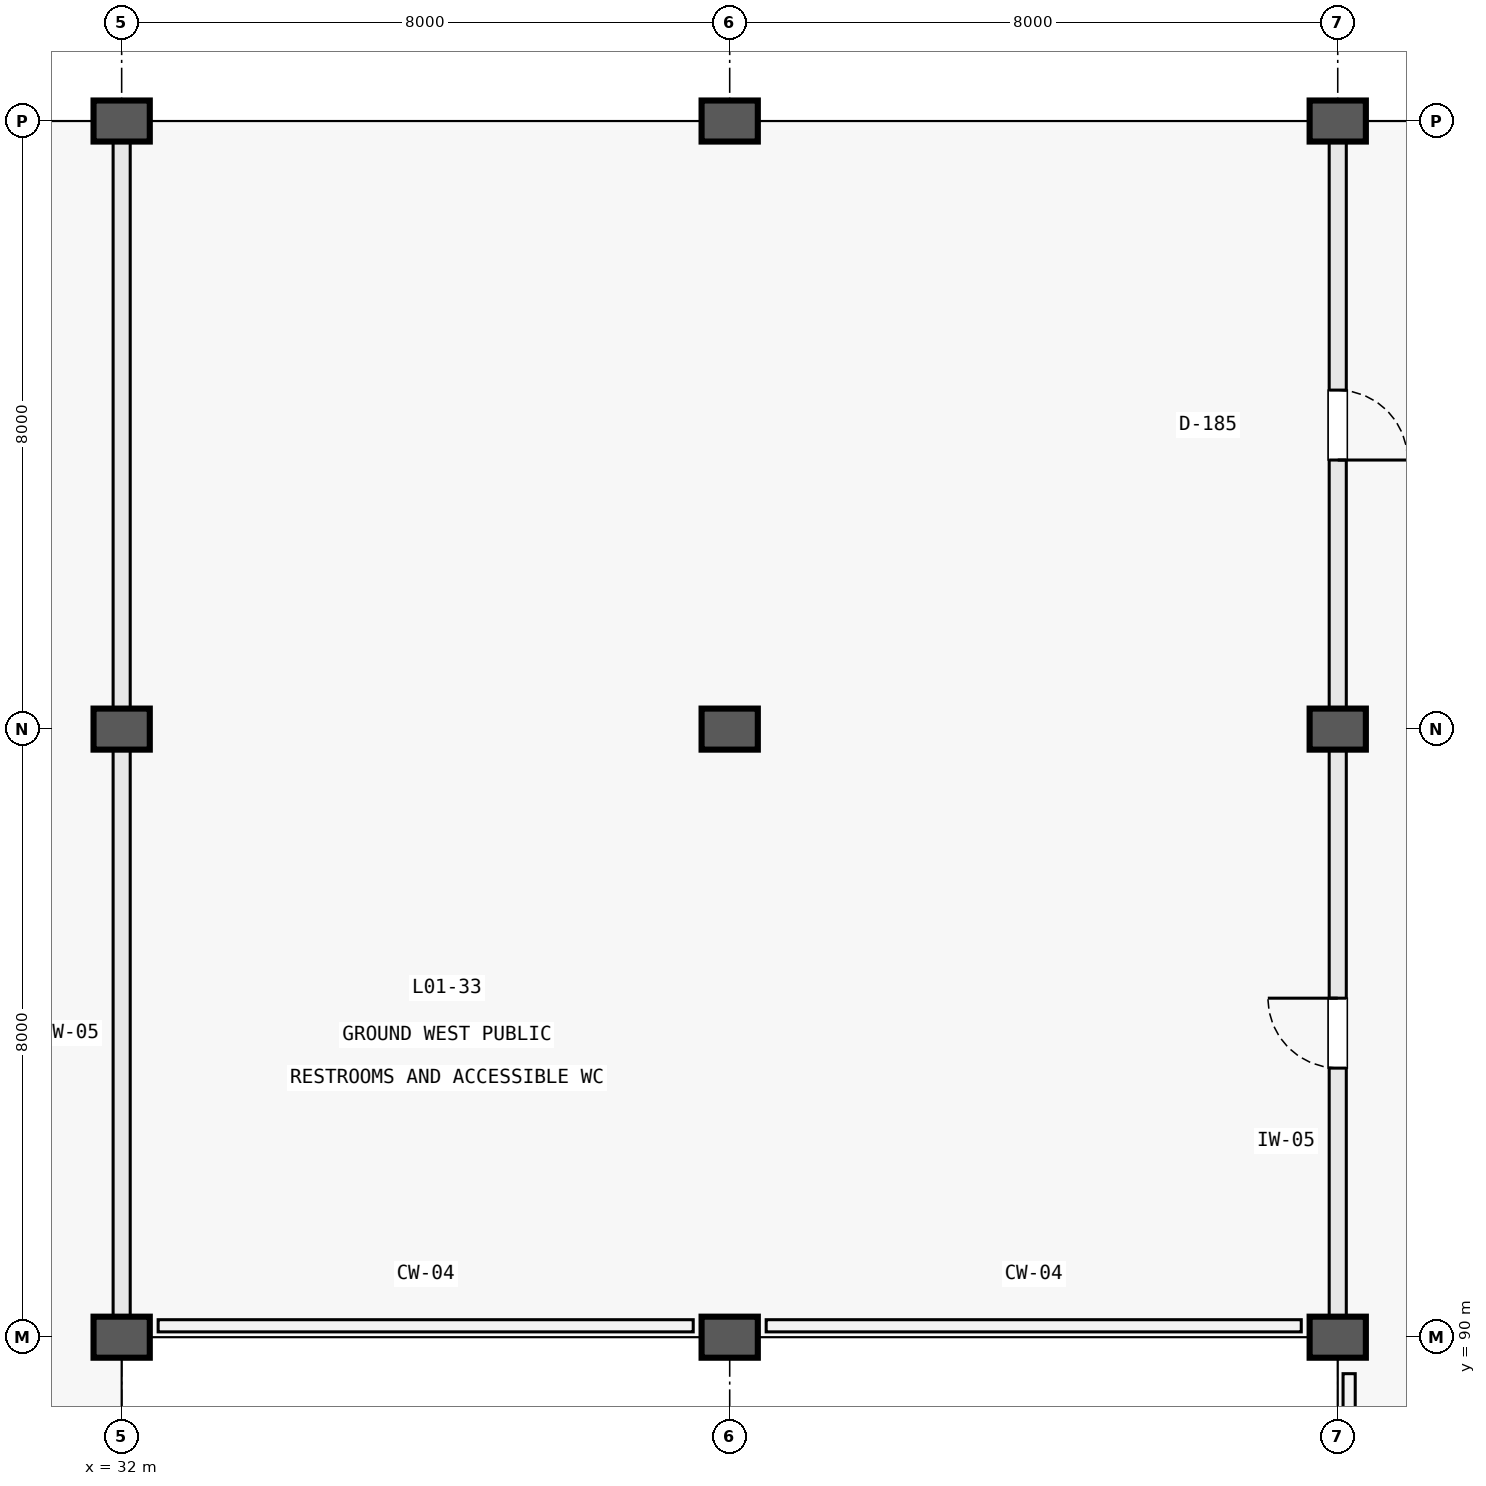
"""IFC4 building model, lengths in metres.
Left out: names, types, materials, properties, quantities, classifications, styles, units other than length and angle.
Written with IfcOpenShell. Run it as: python <this file> out.ifc"""

import sys

from ifc_helpers import new_model, si_unit, direction, frame, frame_2d, origin, origin_2d, place, context, subcontext, project, spatial, rectangle, extrude, element, fill, save


model = new_model("IFC4")
c1 = context("Model", 3, precision=1e-05, world=origin(), true_north=direction((0.0, 1.0)))
c2 = subcontext(c1, "Body", "Model", "MODEL_VIEW")
j1 = project(units=[si_unit("LENGTHUNIT", "METRE"), si_unit("PLANEANGLEUNIT", "RADIAN")], contexts=[c1])
p1 = place(None, origin())
s1 = spatial("IfcSite", under=j1, at=p1, CompositionType="ELEMENT")
p2 = place(p1, origin())
s2 = spatial("IfcBuilding", under=s1, at=p2, CompositionType="ELEMENT")
p3 = place(p2, origin())
s3 = spatial("IfcBuildingStorey", under=s2, at=p3, CompositionType="ELEMENT", Elevation=0.0)
for number, where, z_axis, x_axis in (
    (1, (32.0, 90.0, 0.0), (0.0, 0.0, 1.0), (1.0, 0.0, 0.0)),
    (2, (32.0, 98.0, 0.0), (0.0, 0.0, 1.0), (1.0, 0.0, 0.0)),
    (3, (32.0, 106.0, 0.0), (0.0, 0.0, 1.0), (1.0, 0.0, 0.0)),
    (4, (40.0, 90.0, 0.0), (0.0, 0.0, 1.0), (1.0, 0.0, 0.0)),
    (5, (40.0, 98.0, 0.0), (0.0, 0.0, 1.0), (1.0, 0.0, 0.0)),
    (6, (40.0, 106.0, 0.0), (0.0, 0.0, 1.0), (1.0, 0.0, 0.0)),
    (7, (48.0, 90.0, 0.0), (0.0, 0.0, 1.0), (1.0, 0.0, 0.0)),
    (8, (48.0, 98.0, 0.0), (0.0, 0.0, 1.0), (1.0, 0.0, 0.0)),
    (9, (48.0, 106.0, 0.0), (0.0, 0.0, 1.0), (1.0, 0.0, 0.0)),
):
    element("IfcColumn", number, at=place(p3, frame(where, z_axis=z_axis, x_axis=x_axis)), inside=s3, PredefinedType="COLUMN", context=c2, shape_type="SweptSolid", body=[
        extrude(rectangle(XDim=0.74, YDim=0.54, at=origin_2d()), origin(), (0.0, 0.0, 1.0), 5.4),
    ])
p4 = place(p3, frame((48.0, 90.28, 0.0), z_axis=(0.0, 0.0, 1.0), x_axis=(0.0, 1.0, 0.0)))
e10 = element("IfcWall", 10, at=p4, inside=s3, PredefinedType="PARTITIONING", context=c2, shape_type="SweptSolid", body=[
    extrude(rectangle(XDim=7.44, YDim=0.225, at=frame_2d((3.72, 0.0))), origin(), (0.0, 0.0, 1.0), 3.88),
])
p5 = place(p4, frame((3.26, 0.0, 0.0)))
e11 = element("IfcOpeningElement", 11, at=p5, cuts=e10, PredefinedType="OPENING", context=c2, shape_type="SweptSolid", body=[
    extrude(rectangle(XDim=0.92, YDim=2.1, at=frame_2d((0.46, 1.05))), frame((0.0, 0.125, 0.0), z_axis=(0.0, -1.0, 0.0), x_axis=(1.0, 0.0, 0.0)), (0.0, 0.0, 1.0), 0.249),
])
p6 = place(p3, frame((48.0, 98.28, 0.0), z_axis=(0.0, 0.0, 1.0), x_axis=(0.0, 1.0, 0.0)))
e12 = element("IfcWall", 12, at=p6, inside=s3, PredefinedType="PARTITIONING", context=c2, shape_type="SweptSolid", body=[
    extrude(rectangle(XDim=7.44, YDim=0.225, at=frame_2d((3.72, 0.0))), origin(), (0.0, 0.0, 1.0), 3.88),
])
p7 = place(p6, frame((3.26, 0.0, 0.0)))
e13 = element("IfcOpeningElement", 13, at=p7, cuts=e12, PredefinedType="OPENING", context=c2, shape_type="SweptSolid", body=[
    extrude(rectangle(XDim=0.92, YDim=2.1, at=frame_2d((0.46, 1.05))), frame((0.0, 0.125, 0.0), z_axis=(0.0, -1.0, 0.0), x_axis=(1.0, 0.0, 0.0)), (0.0, 0.0, 1.0), 0.249),
])
for number, where, z_axis, x_axis in (
    (14, (32.0, 90.28, 0.0), (0.0, 0.0, 1.0), (0.0, 1.0, 0.0)),
    (15, (32.0, 98.28, 0.0), (0.0, 0.0, 1.0), (0.0, 1.0, 0.0)),
):
    element("IfcWall", number, at=place(p3, frame(where, z_axis=z_axis, x_axis=x_axis)), inside=s3, PredefinedType="PARTITIONING", context=c2, shape_type="SweptSolid", body=[
        extrude(rectangle(XDim=7.44, YDim=0.225, at=frame_2d((3.72, 0.0))), origin(), (0.0, 0.0, 1.0), 3.88),
    ])
p8 = place(p5, origin())
e16 = element("IfcDoor", 16, at=p8, inside=s3, OperationType="SINGLE_SWING_RIGHT", PredefinedType="DOOR", context=c2, shape_type="SweptSolid", body=[
    extrude(rectangle(XDim=0.92, YDim=2.1, at=frame_2d((0.46, 1.05))), frame((0.0, 0.025, 0.0), z_axis=(0.0, -1.0, 0.0), x_axis=(1.0, 0.0, 0.0)), (0.0, 0.0, 1.0), 0.05),
])
fill(e11, e16)
p9 = place(p7, frame((0.92, 0.0, 0.0), z_axis=(0.0, 0.0, 1.0), x_axis=(-1.0, 0.0, 0.0)))
e17 = element("IfcDoor", 17, at=p9, inside=s3, OperationType="SINGLE_SWING_LEFT", PredefinedType="DOOR", context=c2, shape_type="SweptSolid", body=[
    extrude(rectangle(XDim=0.92, YDim=2.1, at=frame_2d((0.46, 1.05))), frame((0.0, 0.025, 0.0), z_axis=(0.0, -1.0, 0.0), x_axis=(1.0, 0.0, 0.0)), (0.0, 0.0, 1.0), 0.05),
])
fill(e13, e17)
save(model, sys.argv[1])
